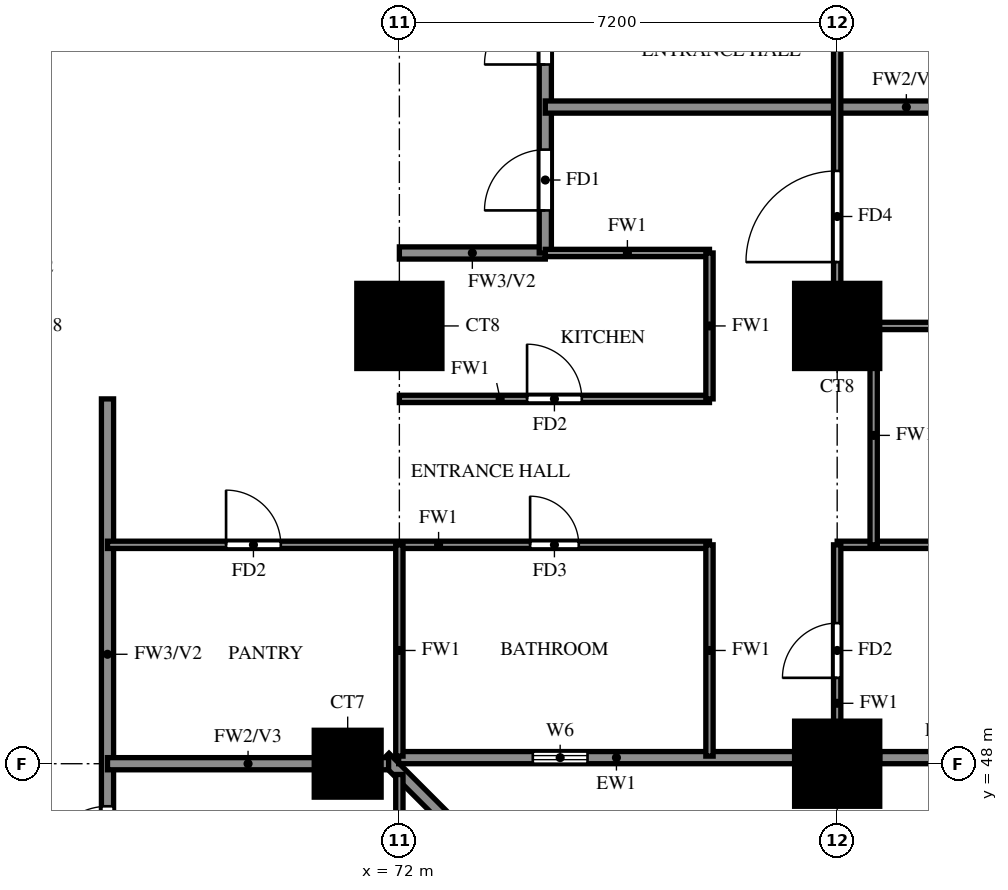
"""IFC4 building model, lengths in metres.
Left out: names, types, materials, properties, quantities, classifications, styles, units other than length and angle.
Written with IfcOpenShell. Run it as: python <this file> out.ifc"""

import sys

from ifc_helpers import new_model, si_unit, direction, frame, frame_2d, origin, origin_2d, place, context, subcontext, project, spatial, rectangle, extrude, source, transform, mapped, element, fill, save


model = new_model("IFC4")
c1 = context("Model", 3, precision=1e-05, world=origin(), true_north=direction((0.0, 1.0)))
c2 = subcontext(c1, "Body", "Model", "MODEL_VIEW")
j1 = project(units=[si_unit("LENGTHUNIT", "METRE"), si_unit("PLANEANGLEUNIT", "RADIAN")], contexts=[c1])
p1 = place(None, origin())
s1 = spatial("IfcSite", under=j1, at=p1, CompositionType="ELEMENT")
p2 = place(p1, origin())
s2 = spatial("IfcBuilding", under=s1, at=p2, CompositionType="ELEMENT")
p3 = place(p2, frame((0.0, 0.0, 55.0)))
s3 = spatial("IfcBuildingStorey", under=s2, at=p3, CompositionType="ELEMENT", Elevation=55.0)
m1 = source(origin(), c2, "Body", "SweptSolid", [
    extrude(rectangle(XDim=1.1, YDim=1.1, at=origin_2d()), origin(), (0.0, 0.0, 1.0), 3.18),
])
p4 = place(p3, frame((71.15, 48.0, 0.0), z_axis=(0.0, 0.0, 1.0), x_axis=(1.0, 0.0, 0.0)))
e1 = element("IfcColumn", 1, at=p4, inside=s3, PredefinedType="COLUMN", context=c2, shape_type="MappedRepresentation", body=[
    mapped(m1, transform((0.0, 0.0, 0.0))),
])
m2 = source(origin(), c2, "Body", "SweptSolid", [
    extrude(rectangle(XDim=1.4, YDim=1.4, at=origin_2d()), origin(), (0.0, 0.0, 1.0), 3.18),
])
for number, where, z_axis, x_axis in (
    (2, (79.2, 48.0, 0.0), (0.0, 0.0, 1.0), (1.0, 0.0, 0.0)),
    (3, (72.0, 55.2, 0.0), (0.0, 0.0, 1.0), (1.0, 0.0, 0.0)),
    (4, (79.2, 55.2, 0.0), (0.0, 0.0, 1.0), (1.0, 0.0, 0.0)),
):
    element("IfcColumn", number, at=place(p3, frame(where, z_axis=z_axis, x_axis=x_axis)), inside=s3, PredefinedType="COLUMN", context=c2, shape_type="MappedRepresentation", body=[
        mapped(m2, transform((0.0, 0.0, 0.0))),
    ])
p5 = place(p3, frame((78.74, 41.118, 0.0), z_axis=(0.0, 0.0, 1.0), x_axis=(-0.707106781187, 0.707106781187, 0.0)))
e5 = element("IfcWall", 5, at=p5, inside=s3, PredefinedType="SOLIDWALL", context=c2, shape_type="SweptSolid", body=[
    extrude(rectangle(XDim=9.874, YDim=0.2, at=frame_2d((4.937, 0.0))), origin(), (0.0, 0.0, 1.0), 3.18),
])
p6 = place(p5, frame((2.264, 0.0, 0.6)))
e6 = element("IfcOpeningElement", 6, at=p6, cuts=e5, PredefinedType="OPENING", context=c2, shape_type="SweptSolid", body=[
    extrude(rectangle(XDim=2.4, YDim=2.4, at=frame_2d((1.2, 1.2))), frame((0.0, 0.11, 0.0), z_axis=(0.0, -1.0, 0.0), x_axis=(1.0, 0.0, 0.0)), (0.0, 0.0, 1.0), 0.22),
])
p7 = place(p5, frame((5.836, 0.0, 0.6)))
e7 = element("IfcOpeningElement", 7, at=p7, cuts=e5, PredefinedType="OPENING", context=c2, shape_type="SweptSolid", body=[
    extrude(rectangle(XDim=2.4, YDim=2.4, at=frame_2d((1.2, 1.2))), frame((0.0, 0.11, 0.0), z_axis=(0.0, -1.0, 0.0), x_axis=(1.0, 0.0, 0.0)), (0.0, 0.0, 1.0), 0.22),
])
p8 = place(p3, frame((71.989, 48.1, 0.0), z_axis=(0.0, 0.0, 1.0), x_axis=(1.0, 0.0, 0.0)))
e8 = element("IfcWall", 8, at=p8, inside=s3, PredefinedType="SOLIDWALL", context=c2, shape_type="SweptSolid", body=[
    extrude(rectangle(XDim=6.511, YDim=0.2, at=frame_2d((3.256, 0.0))), origin(), (0.0, 0.0, 1.0), 3.18),
])
p9 = place(p8, frame((2.206, 0.0, 1.5)))
e9 = element("IfcOpeningElement", 9, at=p9, cuts=e8, PredefinedType="OPENING", context=c2, shape_type="SweptSolid", body=[
    extrude(rectangle(XDim=0.9, YDim=0.9, at=frame_2d((0.45, 0.45))), frame((0.0, 0.11, 0.0), z_axis=(0.0, -1.0, 0.0), x_axis=(1.0, 0.0, 0.0)), (0.0, 0.0, 1.0), 0.22),
])
p10 = place(p3, frame((79.9, 48.1, 0.0), z_axis=(0.0, 0.0, 1.0), x_axis=(1.0, 0.0, 0.0)))
e10 = element("IfcWall", 10, at=p10, inside=s3, PredefinedType="SOLIDWALL", context=c2, shape_type="SweptSolid", body=[
    extrude(rectangle(XDim=5.35, YDim=0.2, at=frame_2d((2.675, 0.0))), origin(), (0.0, 0.0, 1.0), 3.18),
])
p11 = place(p10, frame((1.475, 0.0, 0.6)))
e11 = element("IfcOpeningElement", 11, at=p11, cuts=e10, PredefinedType="OPENING", context=c2, shape_type="SweptSolid", body=[
    extrude(rectangle(XDim=2.4, YDim=2.4, at=frame_2d((1.2, 1.2))), frame((0.0, 0.11, 0.0), z_axis=(0.0, -1.0, 0.0), x_axis=(1.0, 0.0, 0.0)), (0.0, 0.0, 1.0), 0.22),
])
p12 = place(p3, frame((72.0, 56.4, 0.0), z_axis=(0.0, 0.0, 1.0), x_axis=(1.0, 0.0, 0.0)))
e12 = element("IfcWall", 12, at=p12, inside=s3, PredefinedType="SOLIDWALL", context=c2, shape_type="SweptSolid", body=[
    extrude(rectangle(XDim=2.4, YDim=0.2, at=frame_2d((1.2, 0.0))), origin(), (0.0, 0.0, 1.0), 3.18),
])
p13 = place(p3, frame((67.2, 45.6, 0.0), z_axis=(0.0, 0.0, 1.0), x_axis=(0.0, 1.0, 0.0)))
e13 = element("IfcWall", 13, at=p13, inside=s3, PredefinedType="SOLIDWALL", context=c2, shape_type="SweptSolid", body=[
    extrude(rectangle(XDim=8.4, YDim=0.2, at=frame_2d((4.2, 0.0))), origin(), (0.0, 0.0, 1.0), 3.18),
])
p14 = place(p13, frame((0.7, 0.0, 0.0)))
e14 = element("IfcOpeningElement", 14, at=p14, cuts=e13, PredefinedType="OPENING", context=c2, shape_type="SweptSolid", body=[
    extrude(rectangle(XDim=1.0, YDim=2.1, at=frame_2d((0.5, 1.05))), frame((0.0, 0.11, 0.0), z_axis=(0.0, -1.0, 0.0), x_axis=(1.0, 0.0, 0.0)), (0.0, 0.0, 1.0), 0.22),
])
p15 = place(p3, frame((74.4, 56.4, 0.0), z_axis=(0.0, 0.0, 1.0), x_axis=(0.0, 1.0, 0.0)))
e15 = element("IfcWall", 15, at=p15, inside=s3, PredefinedType="SOLIDWALL", context=c2, shape_type="SweptSolid", body=[
    extrude(rectangle(XDim=9.6, YDim=0.2, at=frame_2d((4.8, 0.0))), origin(), (0.0, 0.0, 1.0), 3.18),
])
p16 = place(p15, frame((0.7, 0.0, 0.0)))
e16 = element("IfcOpeningElement", 16, at=p16, cuts=e15, PredefinedType="OPENING", context=c2, shape_type="SweptSolid", body=[
    extrude(rectangle(XDim=1.0, YDim=2.1, at=frame_2d((0.5, 1.05))), frame((0.0, 0.11, 0.0), z_axis=(0.0, -1.0, 0.0), x_axis=(1.0, 0.0, 0.0)), (0.0, 0.0, 1.0), 0.22),
])
p17 = place(p15, frame((3.1, 0.0, 0.0)))
e17 = element("IfcOpeningElement", 17, at=p17, cuts=e15, PredefinedType="OPENING", context=c2, shape_type="SweptSolid", body=[
    extrude(rectangle(XDim=1.0, YDim=2.1, at=frame_2d((0.5, 1.05))), frame((0.0, 0.11, 0.0), z_axis=(0.0, -1.0, 0.0), x_axis=(1.0, 0.0, 0.0)), (0.0, 0.0, 1.0), 0.22),
])
p18 = place(p3, frame((67.2, 48.0, 0.0), z_axis=(0.0, 0.0, 1.0), x_axis=(1.0, 0.0, 0.0)))
e18 = element("IfcWall", 18, at=p18, inside=s3, PredefinedType="SOLIDWALL", context=c2, shape_type="SweptSolid", body=[
    extrude(rectangle(XDim=4.623, YDim=0.2, at=frame_2d((2.312, 0.0))), origin(), (0.0, 0.0, 1.0), 3.18),
])
p19 = place(p3, frame((74.4, 58.8, 0.0), z_axis=(0.0, 0.0, 1.0), x_axis=(1.0, 0.0, 0.0)))
e19 = element("IfcWall", 19, at=p19, inside=s3, PredefinedType="SOLIDWALL", context=c2, shape_type="SweptSolid", body=[
    extrude(rectangle(XDim=11.875, YDim=0.2, at=frame_2d((5.938, 0.0))), origin(), (0.0, 0.0, 1.0), 2.28),
])
p20 = place(p3, frame((67.2, 51.6, 0.0), z_axis=(0.0, 0.0, 1.0), x_axis=(1.0, 0.0, 0.0)))
e20 = element("IfcWall", 20, at=p20, inside=s3, PredefinedType="PARTITIONING", context=c2, shape_type="SweptSolid", body=[
    extrude(rectangle(XDim=9.9, YDim=0.12, at=frame_2d((4.95, 0.0))), origin(), (0.0, 0.0, 1.0), 3.18),
])
p21 = place(p20, frame((6.95, 0.0, 0.0)))
e21 = element("IfcOpeningElement", 21, at=p21, cuts=e20, PredefinedType="OPENING", context=c2, shape_type="SweptSolid", body=[
    extrude(rectangle(XDim=0.8, YDim=2.1, at=frame_2d((0.4, 1.05))), frame((0.0, 0.07, 0.0), z_axis=(0.0, -1.0, 0.0), x_axis=(1.0, 0.0, 0.0)), (0.0, 0.0, 1.0), 0.14),
])
p22 = place(p20, frame((1.95, 0.0, 0.0)))
e22 = element("IfcOpeningElement", 22, at=p22, cuts=e20, PredefinedType="OPENING", context=c2, shape_type="SweptSolid", body=[
    extrude(rectangle(XDim=0.9, YDim=2.1, at=frame_2d((0.45, 1.05))), frame((0.0, 0.07, 0.0), z_axis=(0.0, -1.0, 0.0), x_axis=(1.0, 0.0, 0.0)), (0.0, 0.0, 1.0), 0.14),
])
p23 = place(p3, frame((79.2, 51.6, 0.0), z_axis=(0.0, 0.0, 1.0), x_axis=(1.0, 0.0, 0.0)))
e23 = element("IfcWall", 23, at=p23, inside=s3, PredefinedType="PARTITIONING", context=c2, shape_type="SweptSolid", body=[
    extrude(rectangle(XDim=7.075, YDim=0.12, at=frame_2d((3.538, 0.0))), origin(), (0.0, 0.0, 1.0), 2.28),
])
p24 = place(p23, frame((3.438, 0.0, 0.0)))
e24 = element("IfcOpeningElement", 24, at=p24, cuts=e23, PredefinedType="OPENING", context=c2, shape_type="SweptSolid", body=[
    extrude(rectangle(XDim=0.8, YDim=2.1, at=frame_2d((0.4, 1.05))), frame((0.0, 0.07, 0.0), z_axis=(0.0, -1.0, 0.0), x_axis=(1.0, 0.0, 0.0)), (0.0, 0.0, 1.0), 0.14),
])
p25 = place(p3, frame((72.0, 54.0, 0.0), z_axis=(0.0, 0.0, 1.0), x_axis=(1.0, 0.0, 0.0)))
e25 = element("IfcWall", 25, at=p25, inside=s3, PredefinedType="PARTITIONING", context=c2, shape_type="SweptSolid", body=[
    extrude(rectangle(XDim=5.1, YDim=0.12, at=frame_2d((2.55, 0.0))), origin(), (0.0, 0.0, 1.0), 3.18),
])
p26 = place(p25, frame((2.1, 0.0, 0.0)))
e26 = element("IfcOpeningElement", 26, at=p26, cuts=e25, PredefinedType="OPENING", context=c2, shape_type="SweptSolid", body=[
    extrude(rectangle(XDim=0.9, YDim=2.1, at=frame_2d((0.45, 1.05))), frame((0.0, 0.07, 0.0), z_axis=(0.0, -1.0, 0.0), x_axis=(1.0, 0.0, 0.0)), (0.0, 0.0, 1.0), 0.14),
])
p27 = place(p3, frame((79.2, 55.2, 0.0), z_axis=(0.0, 0.0, 1.0), x_axis=(1.0, 0.0, 0.0)))
e27 = element("IfcWall", 27, at=p27, inside=s3, PredefinedType="PARTITIONING", context=c2, shape_type="SweptSolid", body=[
    extrude(rectangle(XDim=7.075, YDim=0.12, at=frame_2d((3.538, 0.0))), origin(), (0.0, 0.0, 1.0), 3.18),
])
p28 = place(p3, frame((74.4, 56.4, 0.0), z_axis=(0.0, 0.0, 1.0), x_axis=(1.0, 0.0, 0.0)))
e28 = element("IfcWall", 28, at=p28, inside=s3, PredefinedType="PARTITIONING", context=c2, shape_type="SweptSolid", body=[
    extrude(rectangle(XDim=2.7, YDim=0.12, at=frame_2d((1.35, 0.0))), origin(), (0.0, 0.0, 1.0), 3.18),
])
p29 = place(p3, frame((72.0, 33.725, 0.0), z_axis=(0.0, 0.0, 1.0), x_axis=(0.0, 1.0, 0.0)))
e29 = element("IfcWall", 29, at=p29, inside=s3, PredefinedType="PARTITIONING", context=c2, shape_type="SweptSolid", body=[
    extrude(rectangle(XDim=14.098, YDim=0.12, at=frame_2d((7.049, 0.0))), origin(), (0.0, 0.0, 1.0), 2.28),
])
p30 = place(p29, frame((10.075, 0.0, 0.0)))
e30 = element("IfcOpeningElement", 30, at=p30, cuts=e29, PredefinedType="OPENING", context=c2, shape_type="SweptSolid", body=[
    extrude(rectangle(XDim=0.9, YDim=2.1, at=frame_2d((0.45, 1.05))), frame((0.0, 0.07, 0.0), z_axis=(0.0, -1.0, 0.0), x_axis=(1.0, 0.0, 0.0)), (0.0, 0.0, 1.0), 0.14),
])
for number, where, z_axis, x_axis in (
    (31, (72.0, 48.125, 0.0), (0.0, 0.0, 1.0), (0.0, 1.0, 0.0)),
    (32, (77.1, 48.125, 0.0), (0.0, 0.0, 1.0), (0.0, 1.0, 0.0)),
):
    element("IfcWall", number, at=place(p3, frame(where, z_axis=z_axis, x_axis=x_axis)), inside=s3, PredefinedType="PARTITIONING", context=c2, shape_type="SweptSolid", body=[
        extrude(rectangle(XDim=3.475, YDim=0.12, at=frame_2d((1.738, 0.0))), origin(), (0.0, 0.0, 1.0), 3.18),
    ])
p31 = place(p3, frame((77.1, 54.0, 0.0), z_axis=(0.0, 0.0, 1.0), x_axis=(0.0, 1.0, 0.0)))
e33 = element("IfcWall", 33, at=p31, inside=s3, PredefinedType="PARTITIONING", context=c2, shape_type="SweptSolid", body=[
    extrude(rectangle(XDim=2.4, YDim=0.12, at=frame_2d((1.2, 0.0))), origin(), (0.0, 0.0, 1.0), 3.18),
])
p32 = place(p3, frame((79.2, 48.125, 0.0), z_axis=(0.0, 0.0, 1.0), x_axis=(0.0, 1.0, 0.0)))
e34 = element("IfcWall", 34, at=p32, inside=s3, PredefinedType="PARTITIONING", context=c2, shape_type="SweptSolid", body=[
    extrude(rectangle(XDim=3.475, YDim=0.12, at=frame_2d((1.738, 0.0))), origin(), (0.0, 0.0, 1.0), 3.18),
])
p33 = place(p32, frame((1.288, 0.0, 0.0)))
e35 = element("IfcOpeningElement", 35, at=p33, cuts=e34, PredefinedType="OPENING", context=c2, shape_type="SweptSolid", body=[
    extrude(rectangle(XDim=0.9, YDim=2.1, at=frame_2d((0.45, 1.05))), frame((0.0, 0.07, 0.0), z_axis=(0.0, -1.0, 0.0), x_axis=(1.0, 0.0, 0.0)), (0.0, 0.0, 1.0), 0.14),
])
p34 = place(p3, frame((79.2, 55.2, 0.0), z_axis=(0.0, 0.0, 1.0), x_axis=(0.0, 1.0, 0.0)))
e36 = element("IfcWall", 36, at=p34, inside=s3, PredefinedType="PARTITIONING", context=c2, shape_type="SweptSolid", body=[
    extrude(rectangle(XDim=14.4, YDim=0.12, at=frame_2d((7.2, 0.0))), origin(), (0.0, 0.0, 1.0), 3.18),
])
p35 = place(p34, frame((1.05, 0.0, 0.0)))
e37 = element("IfcOpeningElement", 37, at=p35, cuts=e36, PredefinedType="OPENING", context=c2, shape_type="SweptSolid", body=[
    extrude(rectangle(XDim=1.5, YDim=2.1, at=frame_2d((0.75, 1.05))), frame((0.0, 0.07, 0.0), z_axis=(0.0, -1.0, 0.0), x_axis=(1.0, 0.0, 0.0)), (0.0, 0.0, 1.0), 0.14),
])
p36 = place(p34, frame((4.95, 0.0, 0.0)))
e38 = element("IfcOpeningElement", 38, at=p36, cuts=e36, PredefinedType="OPENING", context=c2, shape_type="SweptSolid", body=[
    extrude(rectangle(XDim=0.9, YDim=2.1, at=frame_2d((0.45, 1.05))), frame((0.0, 0.07, 0.0), z_axis=(0.0, -1.0, 0.0), x_axis=(1.0, 0.0, 0.0)), (0.0, 0.0, 1.0), 0.14),
])
p37 = place(p34, frame((10.35, 0.0, 0.0)))
e39 = element("IfcOpeningElement", 39, at=p37, cuts=e36, PredefinedType="OPENING", context=c2, shape_type="SweptSolid", body=[
    extrude(rectangle(XDim=0.9, YDim=2.1, at=frame_2d((0.45, 1.05))), frame((0.0, 0.07, 0.0), z_axis=(0.0, -1.0, 0.0), x_axis=(1.0, 0.0, 0.0)), (0.0, 0.0, 1.0), 0.14),
])
p38 = place(p3, frame((79.8, 51.6, 0.0), z_axis=(0.0, 0.0, 1.0), x_axis=(0.0, 1.0, 0.0)))
e40 = element("IfcWall", 40, at=p38, inside=s3, PredefinedType="PARTITIONING", context=c2, shape_type="SweptSolid", body=[
    extrude(rectangle(XDim=3.6, YDim=0.12, at=frame_2d((1.8, 0.0))), origin(), (0.0, 0.0, 1.0), 3.18),
])
p39 = place(p9, origin())
e41 = element("IfcWindow", 41, at=p39, inside=s3, PartitioningType="SINGLE_PANEL", PredefinedType="WINDOW", context=c2, shape_type="SweptSolid", body=[
    extrude(rectangle(XDim=0.9, YDim=0.9, at=frame_2d((0.45, 0.45))), frame((0.0, 0.03, 0.0), z_axis=(0.0, -1.0, 0.0), x_axis=(1.0, 0.0, 0.0)), (0.0, 0.0, 1.0), 0.06),
])
fill(e9, e41)
p40 = place(p16, origin())
e42 = element("IfcDoor", 42, at=p40, inside=s3, OperationType="SINGLE_SWING_RIGHT", PredefinedType="DOOR", context=c2, shape_type="SweptSolid", body=[
    extrude(rectangle(XDim=1.0, YDim=2.1, at=frame_2d((0.5, 1.05))), frame((0.0, 0.025, 0.0), z_axis=(0.0, -1.0, 0.0), x_axis=(1.0, 0.0, 0.0)), (0.0, 0.0, 1.0), 0.05),
])
fill(e16, e42)
p41 = place(p33, origin())
e43 = element("IfcDoor", 43, at=p41, inside=s3, OperationType="SINGLE_SWING_LEFT", PredefinedType="DOOR", context=c2, shape_type="SweptSolid", body=[
    extrude(rectangle(XDim=0.9, YDim=2.1, at=frame_2d((0.45, 1.05))), frame((0.0, 0.025, 0.0), z_axis=(0.0, -1.0, 0.0), x_axis=(1.0, 0.0, 0.0)), (0.0, 0.0, 1.0), 0.05),
])
fill(e35, e43)
p42 = place(p35, origin())
e44 = element("IfcDoor", 44, at=p42, inside=s3, OperationType="SINGLE_SWING_RIGHT", PredefinedType="DOOR", context=c2, shape_type="SweptSolid", body=[
    extrude(rectangle(XDim=1.5, YDim=2.1, at=frame_2d((0.75, 1.05))), frame((0.0, 0.025, 0.0), z_axis=(0.0, -1.0, 0.0), x_axis=(1.0, 0.0, 0.0)), (0.0, 0.0, 1.0), 0.05),
])
fill(e37, e44)
p43 = place(p21, origin())
e45 = element("IfcDoor", 45, at=p43, inside=s3, OperationType="SINGLE_SWING_LEFT", PredefinedType="DOOR", context=c2, shape_type="SweptSolid", body=[
    extrude(rectangle(XDim=0.8, YDim=2.1, at=frame_2d((0.4, 1.05))), frame((0.0, 0.025, 0.0), z_axis=(0.0, -1.0, 0.0), x_axis=(1.0, 0.0, 0.0)), (0.0, 0.0, 1.0), 0.05),
])
fill(e21, e45)
p44 = place(p26, origin())
e46 = element("IfcDoor", 46, at=p44, inside=s3, OperationType="SINGLE_SWING_LEFT", PredefinedType="DOOR", context=c2, shape_type="SweptSolid", body=[
    extrude(rectangle(XDim=0.9, YDim=2.1, at=frame_2d((0.45, 1.05))), frame((0.0, 0.025, 0.0), z_axis=(0.0, -1.0, 0.0), x_axis=(1.0, 0.0, 0.0)), (0.0, 0.0, 1.0), 0.05),
])
fill(e26, e46)
p45 = place(p22, origin())
e47 = element("IfcDoor", 47, at=p45, inside=s3, OperationType="SINGLE_SWING_RIGHT", PredefinedType="DOOR", context=c2, shape_type="SweptSolid", body=[
    extrude(rectangle(XDim=0.9, YDim=2.1, at=frame_2d((0.45, 1.05))), frame((0.0, 0.025, 0.0), z_axis=(0.0, -1.0, 0.0), x_axis=(1.0, 0.0, 0.0)), (0.0, 0.0, 1.0), 0.05),
])
fill(e22, e47)
p46 = place(p17, origin())
e48 = element("IfcDoor", 48, at=p46, inside=s3, OperationType="SINGLE_SWING_RIGHT", PredefinedType="DOOR", context=c2, shape_type="SweptSolid", body=[
    extrude(rectangle(XDim=1.0, YDim=2.1, at=frame_2d((0.5, 1.05))), frame((0.0, 0.025, 0.0), z_axis=(0.0, -1.0, 0.0), x_axis=(1.0, 0.0, 0.0)), (0.0, 0.0, 1.0), 0.05),
])
fill(e17, e48)
p47 = place(p14, origin())
e49 = element("IfcDoor", 49, at=p47, inside=s3, OperationType="SINGLE_SWING_RIGHT", PredefinedType="DOOR", context=c2, shape_type="SweptSolid", body=[
    extrude(rectangle(XDim=1.0, YDim=2.1, at=frame_2d((0.5, 1.05))), frame((0.0, 0.025, 0.0), z_axis=(0.0, -1.0, 0.0), x_axis=(1.0, 0.0, 0.0)), (0.0, 0.0, 1.0), 0.05),
])
fill(e14, e49)
save(model, sys.argv[1])
